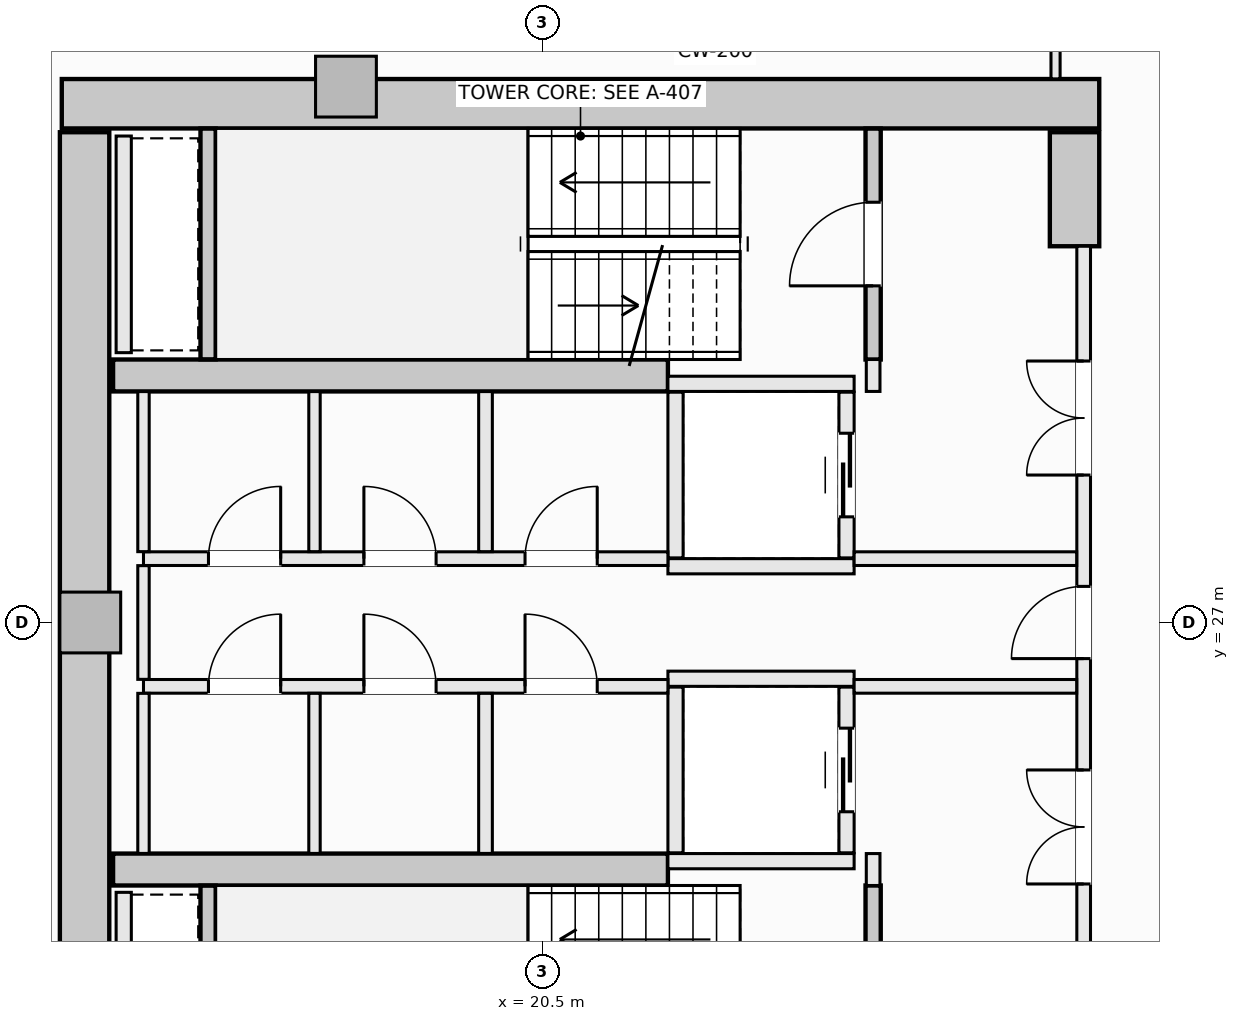
"""IFC4 building model, lengths in metres.
Left out: names, types, materials, properties, quantities, classifications, styles, units other than length and angle.
Written with IfcOpenShell. Run it as: python <this file> out.ifc"""

import sys

from ifc_helpers import new_model, si_unit, direction, frame, frame_2d, origin, origin_2d, place, context, subcontext, project, spatial, rectangle, extrude, element, fill, save


model = new_model("IFC4")
c1 = context("Model", 3, precision=1e-05, world=origin(), true_north=direction((0.0, 1.0)))
c2 = subcontext(c1, "Body", "Model", "MODEL_VIEW")
j1 = project(units=[si_unit("LENGTHUNIT", "METRE"), si_unit("PLANEANGLEUNIT", "RADIAN")], contexts=[c1])
p1 = place(None, origin())
s1 = spatial("IfcSite", under=j1, at=p1, CompositionType="ELEMENT")
p2 = place(p1, origin())
s2 = spatial("IfcBuilding", under=s1, at=p2, CompositionType="ELEMENT")
p3 = place(p2, frame((0.0, 0.0, 152.9)))
s3 = spatial("IfcBuildingStorey", under=s2, at=p3, CompositionType="ELEMENT", Elevation=152.9)
p4 = place(p3, frame((14.175, 33.825, -0.27), z_axis=(0.0, 0.0, 1.0), x_axis=(1.0, 0.0, 0.0)))
e1 = element("IfcWall", 1, at=p4, inside=s3, PredefinedType="SHEAR", context=c2, shape_type="SweptSolid", body=[
    extrude(rectangle(XDim=13.65, YDim=0.65, at=frame_2d((6.825, 0.0))), origin(), (0.0, 0.0, 1.0), 3.4),
])
p5 = place(p3, frame((14.475, 20.55, -0.27), z_axis=(0.0, 0.0, 1.0), x_axis=(0.0, 1.0, 0.0)))
e2 = element("IfcWall", 2, at=p5, inside=s3, PredefinedType="SHEAR", context=c2, shape_type="SweptSolid", body=[
    extrude(rectangle(XDim=12.9, YDim=0.65, at=frame_2d((6.45, 0.0))), origin(), (0.0, 0.0, 1.0), 3.4),
])
p6 = place(p3, frame((27.5, 31.95, -0.27), z_axis=(0.0, 0.0, 1.0), x_axis=(0.0, 1.0, 0.0)))
e3 = element("IfcWall", 3, at=p6, inside=s3, PredefinedType="SHEAR", context=c2, shape_type="SweptSolid", body=[
    extrude(rectangle(XDim=1.5, YDim=0.65, at=frame_2d((0.75, 0.0))), origin(), (0.0, 0.0, 1.0), 3.4),
])
for number, where, z_axis, x_axis in (
    (4, (14.85, 30.25, -0.27), (0.0, 0.0, 1.0), (1.0, 0.0, 0.0)),
    (5, (14.85, 23.75, -0.27), (0.0, 0.0, 1.0), (1.0, 0.0, 0.0)),
):
    element("IfcWall", number, at=place(p3, frame(where, z_axis=z_axis, x_axis=x_axis)), inside=s3, PredefinedType="SHEAR", context=c2, shape_type="SweptSolid", body=[
        extrude(rectangle(XDim=7.3, YDim=0.42, at=frame_2d((3.65, 0.0))), origin(), (0.0, 0.0, 1.0), 3.4),
    ])
for number, where, z_axis, x_axis in (
    (6, (17.914, 34.05, -0.27), (0.0, 0.0, 1.0), (1.0, 0.0, 0.0)),
    (7, (14.55, 27.0, -0.27), (0.0, 0.0, 1.0), (1.0, 0.0, 0.0)),
):
    element("IfcColumn", number, at=place(p3, frame(where, z_axis=z_axis, x_axis=x_axis)), inside=s3, PredefinedType="PILASTER", context=c2, shape_type="SweptSolid", body=[
        extrude(rectangle(XDim=0.8, YDim=0.8, at=origin_2d()), origin(), (0.0, 0.0, 1.0), 3.4),
    ])
p7 = place(p3, frame((24.85, 30.46, -0.27), z_axis=(0.0, 0.0, 1.0), x_axis=(0.0, 1.0, 0.0)))
e8 = element("IfcWall", 8, at=p7, inside=s3, PredefinedType="SHEAR", context=c2, shape_type="SweptSolid", body=[
    extrude(rectangle(XDim=3.038, YDim=0.2, at=frame_2d((1.519, 0.0))), origin(), (0.0, 0.0, 1.0), 3.4),
])
p8 = place(p7, frame((0.969, 0.0, 0.27)))
e9 = element("IfcOpeningElement", 9, at=p8, cuts=e8, PredefinedType="OPENING", context=c2, shape_type="SweptSolid", body=[
    extrude(rectangle(XDim=1.1, YDim=2.15, at=frame_2d((0.55, 1.075))), frame((0.0, 0.11, 0.0), z_axis=(0.0, -1.0, 0.0), x_axis=(1.0, 0.0, 0.0)), (0.0, 0.0, 1.0), 0.22),
])
p9 = place(p3, frame((16.1, 30.462, -0.27), z_axis=(0.0, 0.0, 1.0), x_axis=(0.0, 1.0, 0.0)))
e10 = element("IfcWall", 10, at=p9, inside=s3, PredefinedType="SHEAR", context=c2, shape_type="SweptSolid", body=[
    extrude(rectangle(XDim=3.036, YDim=0.2, at=frame_2d((1.518, 0.0))), origin(), (0.0, 0.0, 1.0), 3.4),
])
p10 = place(p3, frame((24.85, 20.502, -0.27), z_axis=(0.0, 0.0, 1.0), x_axis=(0.0, 1.0, 0.0)))
e11 = element("IfcWall", 11, at=p10, inside=s3, PredefinedType="SHEAR", context=c2, shape_type="SweptSolid", body=[
    extrude(rectangle(XDim=3.038, YDim=0.2, at=frame_2d((1.519, 0.0))), origin(), (0.0, 0.0, 1.0), 3.4),
])
p11 = place(p10, frame((0.969, 0.0, 0.27)))
e12 = element("IfcOpeningElement", 12, at=p11, cuts=e11, PredefinedType="OPENING", context=c2, shape_type="SweptSolid", body=[
    extrude(rectangle(XDim=1.1, YDim=2.15, at=frame_2d((0.55, 1.075))), frame((0.0, 0.11, 0.0), z_axis=(0.0, -1.0, 0.0), x_axis=(1.0, 0.0, 0.0)), (0.0, 0.0, 1.0), 0.22),
])
p12 = place(p3, frame((16.1, 20.502, -0.27), z_axis=(0.0, 0.0, 1.0), x_axis=(0.0, 1.0, 0.0)))
e13 = element("IfcWall", 13, at=p12, inside=s3, PredefinedType="SHEAR", context=c2, shape_type="SweptSolid", body=[
    extrude(rectangle(XDim=3.036, YDim=0.2, at=frame_2d((1.518, 0.0))), origin(), (0.0, 0.0, 1.0), 3.4),
])
for number, where, z_axis, x_axis in (
    (14, (22.15, 30.14, 0.0), (0.0, 0.0, 1.0), (1.0, 0.0, 0.0)),
    (15, (22.15, 27.74, 0.0), (0.0, 0.0, 1.0), (1.0, 0.0, 0.0)),
):
    element("IfcWall", number, at=place(p3, frame(where, z_axis=z_axis, x_axis=x_axis)), inside=s3, PredefinedType="SOLIDWALL", context=c2, shape_type="SweptSolid", body=[
        extrude(rectangle(XDim=2.45, YDim=0.2, at=frame_2d((1.225, 0.0))), origin(), (0.0, 0.0, 1.0), 3.13),
    ])
p13 = place(p3, frame((22.25, 27.85, 0.0), z_axis=(0.0, 0.0, 1.0), x_axis=(0.0, 1.0, 0.0)))
e16 = element("IfcWall", 16, at=p13, inside=s3, PredefinedType="SOLIDWALL", context=c2, shape_type="SweptSolid", body=[
    extrude(rectangle(XDim=2.18, YDim=0.2, at=frame_2d((1.09, 0.0))), origin(), (0.0, 0.0, 1.0), 3.13),
])
p14 = place(p3, frame((24.5, 27.85, 0.0), z_axis=(0.0, 0.0, 1.0), x_axis=(0.0, 1.0, 0.0)))
e17 = element("IfcWall", 17, at=p14, inside=s3, PredefinedType="SOLIDWALL", context=c2, shape_type="SweptSolid", body=[
    extrude(rectangle(XDim=2.18, YDim=0.2, at=frame_2d((1.09, 0.0))), origin(), (0.0, 0.0, 1.0), 3.13),
])
p15 = place(p14, frame((0.54, 0.0, 0.0)))
e18 = element("IfcOpeningElement", 18, at=p15, cuts=e17, PredefinedType="OPENING", context=c2, shape_type="SweptSolid", body=[
    extrude(rectangle(XDim=1.1, YDim=2.2, at=frame_2d((0.55, 1.1))), frame((0.0, 0.11, 0.0), z_axis=(0.0, -1.0, 0.0), x_axis=(1.0, 0.0, 0.0)), (0.0, 0.0, 1.0), 0.22),
])
for number, where, z_axis, x_axis in (
    (19, (22.15, 26.26, 0.0), (0.0, 0.0, 1.0), (1.0, 0.0, 0.0)),
    (20, (22.15, 23.86, 0.0), (0.0, 0.0, 1.0), (1.0, 0.0, 0.0)),
):
    element("IfcWall", number, at=place(p3, frame(where, z_axis=z_axis, x_axis=x_axis)), inside=s3, PredefinedType="SOLIDWALL", context=c2, shape_type="SweptSolid", body=[
        extrude(rectangle(XDim=2.45, YDim=0.2, at=frame_2d((1.225, 0.0))), origin(), (0.0, 0.0, 1.0), 3.13),
    ])
p16 = place(p3, frame((22.25, 23.97, 0.0), z_axis=(0.0, 0.0, 1.0), x_axis=(0.0, 1.0, 0.0)))
e21 = element("IfcWall", 21, at=p16, inside=s3, PredefinedType="SOLIDWALL", context=c2, shape_type="SweptSolid", body=[
    extrude(rectangle(XDim=2.18, YDim=0.2, at=frame_2d((1.09, 0.0))), origin(), (0.0, 0.0, 1.0), 3.13),
])
p17 = place(p3, frame((24.5, 23.97, 0.0), z_axis=(0.0, 0.0, 1.0), x_axis=(0.0, 1.0, 0.0)))
e22 = element("IfcWall", 22, at=p17, inside=s3, PredefinedType="SOLIDWALL", context=c2, shape_type="SweptSolid", body=[
    extrude(rectangle(XDim=2.18, YDim=0.2, at=frame_2d((1.09, 0.0))), origin(), (0.0, 0.0, 1.0), 3.13),
])
p18 = place(p17, frame((0.54, 0.0, 0.0)))
e23 = element("IfcOpeningElement", 23, at=p18, cuts=e22, PredefinedType="OPENING", context=c2, shape_type="SweptSolid", body=[
    extrude(rectangle(XDim=1.1, YDim=2.2, at=frame_2d((0.55, 1.1))), frame((0.0, 0.11, 0.0), z_axis=(0.0, -1.0, 0.0), x_axis=(1.0, 0.0, 0.0)), (0.0, 0.0, 1.0), 0.22),
])
for number, where, z_axis, x_axis in (
    (24, (14.99, 30.55, 0.0), (0.0, 0.0, 1.0), (0.0, 1.0, 0.0)),
    (25, (14.99, 20.6, 0.0), (0.0, 0.0, 1.0), (0.0, 1.0, 0.0)),
):
    element("IfcWall", number, at=place(p3, frame(where, z_axis=z_axis, x_axis=x_axis)), inside=s3, PredefinedType="SOLIDWALL", context=c2, shape_type="SweptSolid", body=[
        extrude(rectangle(XDim=2.85, YDim=0.2, at=frame_2d((1.425, 0.0))), origin(), (0.0, 0.0, 1.0), 3.13),
    ])
for number, where, z_axis, x_axis in (
    (26, (24.85, 23.54, 0.0), (0.0, 0.0, 1.0), (0.0, 1.0, 0.0)),
    (27, (24.85, 30.04, 0.0), (0.0, 0.0, 1.0), (0.0, 1.0, 0.0)),
):
    element("IfcWall", number, at=place(p3, frame(where, z_axis=z_axis, x_axis=x_axis)), inside=s3, PredefinedType="SOLIDWALL", context=c2, shape_type="SweptSolid", body=[
        extrude(rectangle(XDim=0.42, YDim=0.18, at=frame_2d((0.21, 0.0))), origin(), (0.0, 0.0, 1.0), 3.13),
    ])
p19 = place(p3, frame((27.62, 22.05, 0.0), z_axis=(0.0, 0.0, 1.0), x_axis=(0.0, 1.0, 0.0)))
e28 = element("IfcWall", 28, at=p19, inside=s3, PredefinedType="SOLIDWALL", context=c2, shape_type="SweptSolid", body=[
    extrude(rectangle(XDim=9.9, YDim=0.18, at=frame_2d((4.95, 0.0))), origin(), (0.0, 0.0, 1.0), 3.13),
])
p20 = place(p19, frame((4.475, 0.0, 0.0)))
e29 = element("IfcOpeningElement", 29, at=p20, cuts=e28, PredefinedType="OPENING", context=c2, shape_type="SweptSolid", body=[
    extrude(rectangle(XDim=0.95, YDim=2.1, at=frame_2d((0.475, 1.05))), frame((0.0, 0.1, 0.0), z_axis=(0.0, -1.0, 0.0), x_axis=(1.0, 0.0, 0.0)), (0.0, 0.0, 1.0), 0.2),
])
p21 = place(p19, frame((6.89, 0.0, 0.0)))
e30 = element("IfcOpeningElement", 30, at=p21, cuts=e28, PredefinedType="OPENING", context=c2, shape_type="SweptSolid", body=[
    extrude(rectangle(XDim=1.5, YDim=2.2, at=frame_2d((0.75, 1.1))), frame((0.0, 0.1, 0.0), z_axis=(0.0, -1.0, 0.0), x_axis=(1.0, 0.0, 0.0)), (0.0, 0.0, 1.0), 0.2),
])
p22 = place(p19, frame((1.51, 0.0, 0.0)))
e31 = element("IfcOpeningElement", 31, at=p22, cuts=e28, PredefinedType="OPENING", context=c2, shape_type="SweptSolid", body=[
    extrude(rectangle(XDim=1.5, YDim=2.2, at=frame_2d((0.75, 1.1))), frame((0.0, 0.1, 0.0), z_axis=(0.0, -1.0, 0.0), x_axis=(1.0, 0.0, 0.0)), (0.0, 0.0, 1.0), 0.2),
])
p23 = place(p3, frame((15.25, 27.84, 0.0), z_axis=(0.0, 0.0, 1.0), x_axis=(1.0, 0.0, 0.0)))
e32 = element("IfcWall", 32, at=p23, inside=s3, PredefinedType="SOLIDWALL", context=c2, shape_type="SweptSolid", body=[
    extrude(rectangle(XDim=6.9, YDim=0.18, at=frame_2d((3.45, 0.0))), origin(), (0.0, 0.0, 1.0), 3.13),
])
p24 = place(p23, frame((5.02, 0.0, 0.0)))
e33 = element("IfcOpeningElement", 33, at=p24, cuts=e32, PredefinedType="OPENING", context=c2, shape_type="SweptSolid", body=[
    extrude(rectangle(XDim=0.95, YDim=2.1, at=frame_2d((0.475, 1.05))), frame((0.0, 0.1, 0.0), z_axis=(0.0, -1.0, 0.0), x_axis=(1.0, 0.0, 0.0)), (0.0, 0.0, 1.0), 0.2),
])
p25 = place(p23, frame((0.855, 0.0, 0.0)))
e34 = element("IfcOpeningElement", 34, at=p25, cuts=e32, PredefinedType="OPENING", context=c2, shape_type="SweptSolid", body=[
    extrude(rectangle(XDim=0.95, YDim=2.1, at=frame_2d((0.475, 1.05))), frame((0.0, 0.1, 0.0), z_axis=(0.0, -1.0, 0.0), x_axis=(1.0, 0.0, 0.0)), (0.0, 0.0, 1.0), 0.2),
])
p26 = place(p23, frame((2.9, 0.0, 0.0)))
e35 = element("IfcOpeningElement", 35, at=p26, cuts=e32, PredefinedType="OPENING", context=c2, shape_type="SweptSolid", body=[
    extrude(rectangle(XDim=0.95, YDim=2.1, at=frame_2d((0.475, 1.05))), frame((0.0, 0.1, 0.0), z_axis=(0.0, -1.0, 0.0), x_axis=(1.0, 0.0, 0.0)), (0.0, 0.0, 1.0), 0.2),
])
p27 = place(p3, frame((24.6, 27.84, 0.0), z_axis=(0.0, 0.0, 1.0), x_axis=(1.0, 0.0, 0.0)))
e36 = element("IfcWall", 36, at=p27, inside=s3, PredefinedType="SOLIDWALL", context=c2, shape_type="SweptSolid", body=[
    extrude(rectangle(XDim=2.928, YDim=0.18, at=frame_2d((1.464, 0.0))), origin(), (0.0, 0.0, 1.0), 3.13),
])
p28 = place(p3, frame((15.25, 26.16, 0.0), z_axis=(0.0, 0.0, 1.0), x_axis=(1.0, 0.0, 0.0)))
e37 = element("IfcWall", 37, at=p28, inside=s3, PredefinedType="SOLIDWALL", context=c2, shape_type="SweptSolid", body=[
    extrude(rectangle(XDim=6.9, YDim=0.18, at=frame_2d((3.45, 0.0))), origin(), (0.0, 0.0, 1.0), 3.13),
])
p29 = place(p28, frame((5.02, 0.0, 0.0)))
e38 = element("IfcOpeningElement", 38, at=p29, cuts=e37, PredefinedType="OPENING", context=c2, shape_type="SweptSolid", body=[
    extrude(rectangle(XDim=0.95, YDim=2.1, at=frame_2d((0.475, 1.05))), frame((0.0, 0.1, 0.0), z_axis=(0.0, -1.0, 0.0), x_axis=(1.0, 0.0, 0.0)), (0.0, 0.0, 1.0), 0.2),
])
p30 = place(p28, frame((0.855, 0.0, 0.0)))
e39 = element("IfcOpeningElement", 39, at=p30, cuts=e37, PredefinedType="OPENING", context=c2, shape_type="SweptSolid", body=[
    extrude(rectangle(XDim=0.95, YDim=2.1, at=frame_2d((0.475, 1.05))), frame((0.0, 0.1, 0.0), z_axis=(0.0, -1.0, 0.0), x_axis=(1.0, 0.0, 0.0)), (0.0, 0.0, 1.0), 0.2),
])
p31 = place(p28, frame((2.9, 0.0, 0.0)))
e40 = element("IfcOpeningElement", 40, at=p31, cuts=e37, PredefinedType="OPENING", context=c2, shape_type="SweptSolid", body=[
    extrude(rectangle(XDim=0.95, YDim=2.1, at=frame_2d((0.475, 1.05))), frame((0.0, 0.1, 0.0), z_axis=(0.0, -1.0, 0.0), x_axis=(1.0, 0.0, 0.0)), (0.0, 0.0, 1.0), 0.2),
])
p32 = place(p3, frame((24.6, 26.16, 0.0), z_axis=(0.0, 0.0, 1.0), x_axis=(1.0, 0.0, 0.0)))
e41 = element("IfcWall", 41, at=p32, inside=s3, PredefinedType="SOLIDWALL", context=c2, shape_type="SweptSolid", body=[
    extrude(rectangle(XDim=2.928, YDim=0.18, at=frame_2d((1.464, 0.0))), origin(), (0.0, 0.0, 1.0), 3.13),
])
p33 = place(p3, frame((15.25, 23.962, 0.0), z_axis=(0.0, 0.0, 1.0), x_axis=(0.0, 1.0, 0.0)))
e42 = element("IfcWall", 42, at=p33, inside=s3, PredefinedType="PARTITIONING", context=c2, shape_type="SweptSolid", body=[
    extrude(rectangle(XDim=2.106, YDim=0.15, at=frame_2d((1.053, 0.0))), origin(), (0.0, 0.0, 1.0), 3.13),
])
p34 = place(p3, frame((15.25, 26.252, 0.0), z_axis=(0.0, 0.0, 1.0), x_axis=(0.0, 1.0, 0.0)))
e43 = element("IfcWall", 43, at=p34, inside=s3, PredefinedType="PARTITIONING", context=c2, shape_type="SweptSolid", body=[
    extrude(rectangle(XDim=1.496, YDim=0.15, at=frame_2d((0.748, 0.0))), origin(), (0.0, 0.0, 1.0), 3.13),
])
p35 = place(p3, frame((15.25, 27.932, 0.0), z_axis=(0.0, 0.0, 1.0), x_axis=(0.0, 1.0, 0.0)))
e44 = element("IfcWall", 44, at=p35, inside=s3, PredefinedType="PARTITIONING", context=c2, shape_type="SweptSolid", body=[
    extrude(rectangle(XDim=2.106, YDim=0.15, at=frame_2d((1.053, 0.0))), origin(), (0.0, 0.0, 1.0), 3.13),
])
for number, where, z_axis, x_axis in (
    (45, (19.75, 23.962, 0.0), (0.0, 0.0, 1.0), (0.0, 1.0, 0.0)),
    (46, (19.75, 27.932, 0.0), (0.0, 0.0, 1.0), (0.0, 1.0, 0.0)),
):
    element("IfcWall", number, at=place(p3, frame(where, z_axis=z_axis, x_axis=x_axis)), inside=s3, PredefinedType="SOLIDWALL", context=c2, shape_type="SweptSolid", body=[
        extrude(rectangle(XDim=2.106, YDim=0.18, at=frame_2d((1.053, 0.0))), origin(), (0.0, 0.0, 1.0), 3.13),
    ])
for number, where, z_axis, x_axis in (
    (47, (17.5, 23.962, 0.0), (0.0, 0.0, 1.0), (0.0, 1.0, 0.0)),
    (48, (17.5, 27.932, 0.0), (0.0, 0.0, 1.0), (0.0, 1.0, 0.0)),
):
    element("IfcWall", number, at=place(p3, frame(where, z_axis=z_axis, x_axis=x_axis)), inside=s3, PredefinedType="PARTITIONING", context=c2, shape_type="SweptSolid", body=[
        extrude(rectangle(XDim=2.106, YDim=0.15, at=frame_2d((1.053, 0.0))), origin(), (0.0, 0.0, 1.0), 3.13),
    ])
p36 = place(p3, frame((27.25, 34.152, 0.0), z_axis=(0.0, 0.0, 1.0), x_axis=(0.0, 1.0, 0.0)))
e49 = element("IfcWall", 49, at=p36, inside=s3, PredefinedType="PARTITIONING", context=c2, shape_type="SweptSolid", body=[
    extrude(rectangle(XDim=0.806, YDim=0.12, at=frame_2d((0.403, 0.0))), origin(), (0.0, 0.0, 1.0), 3.13),
])
p37 = place(p8, origin())
e50 = element("IfcDoor", 50, at=p37, inside=s3, OperationType="SINGLE_SWING_LEFT", PredefinedType="DOOR", context=c2, shape_type="SweptSolid", body=[
    extrude(rectangle(XDim=1.1, YDim=2.15, at=frame_2d((0.55, 1.075))), frame((0.0, 0.025, 0.0), z_axis=(0.0, -1.0, 0.0), x_axis=(1.0, 0.0, 0.0)), (0.0, 0.0, 1.0), 0.05),
])
fill(e9, e50)
p38 = place(p15, origin())
e51 = element("IfcDoor", 51, at=p38, inside=s3, OperationType="SLIDING_TO_LEFT", PredefinedType="DOOR", context=c2, shape_type="SweptSolid", body=[
    extrude(rectangle(XDim=1.1, YDim=2.2, at=frame_2d((0.55, 1.1))), frame((0.0, 0.025, 0.0), z_axis=(0.0, -1.0, 0.0), x_axis=(1.0, 0.0, 0.0)), (0.0, 0.0, 1.0), 0.05),
])
fill(e18, e51)
p39 = place(p18, origin())
e52 = element("IfcDoor", 52, at=p39, inside=s3, OperationType="SLIDING_TO_LEFT", PredefinedType="DOOR", context=c2, shape_type="SweptSolid", body=[
    extrude(rectangle(XDim=1.1, YDim=2.2, at=frame_2d((0.55, 1.1))), frame((0.0, 0.025, 0.0), z_axis=(0.0, -1.0, 0.0), x_axis=(1.0, 0.0, 0.0)), (0.0, 0.0, 1.0), 0.05),
])
fill(e23, e52)
p40 = place(p20, origin())
e53 = element("IfcDoor", 53, at=p40, inside=s3, OperationType="SINGLE_SWING_LEFT", PredefinedType="DOOR", context=c2, shape_type="SweptSolid", body=[
    extrude(rectangle(XDim=0.95, YDim=2.1, at=frame_2d((0.475, 1.05))), frame((0.0, 0.025, 0.0), z_axis=(0.0, -1.0, 0.0), x_axis=(1.0, 0.0, 0.0)), (0.0, 0.0, 1.0), 0.05),
])
fill(e29, e53)
p41 = place(p21, origin())
e54 = element("IfcDoor", 54, at=p41, inside=s3, OperationType="DOUBLE_DOOR_SINGLE_SWING", PredefinedType="DOOR", context=c2, shape_type="SweptSolid", body=[
    extrude(rectangle(XDim=1.5, YDim=2.2, at=frame_2d((0.75, 1.1))), frame((0.0, 0.025, 0.0), z_axis=(0.0, -1.0, 0.0), x_axis=(1.0, 0.0, 0.0)), (0.0, 0.0, 1.0), 0.05),
])
fill(e30, e54)
p42 = place(p22, origin())
e55 = element("IfcDoor", 55, at=p42, inside=s3, OperationType="DOUBLE_DOOR_SINGLE_SWING", PredefinedType="DOOR", context=c2, shape_type="SweptSolid", body=[
    extrude(rectangle(XDim=1.5, YDim=2.2, at=frame_2d((0.75, 1.1))), frame((0.0, 0.025, 0.0), z_axis=(0.0, -1.0, 0.0), x_axis=(1.0, 0.0, 0.0)), (0.0, 0.0, 1.0), 0.05),
])
fill(e31, e55)
p43 = place(p24, origin())
e56 = element("IfcDoor", 56, at=p43, inside=s3, OperationType="SINGLE_SWING_RIGHT", PredefinedType="DOOR", context=c2, shape_type="SweptSolid", body=[
    extrude(rectangle(XDim=0.95, YDim=2.1, at=frame_2d((0.475, 1.05))), frame((0.0, 0.025, 0.0), z_axis=(0.0, -1.0, 0.0), x_axis=(1.0, 0.0, 0.0)), (0.0, 0.0, 1.0), 0.05),
])
fill(e33, e56)
p44 = place(p29, origin())
e57 = element("IfcDoor", 57, at=p44, inside=s3, OperationType="SINGLE_SWING_LEFT", PredefinedType="DOOR", context=c2, shape_type="SweptSolid", body=[
    extrude(rectangle(XDim=0.95, YDim=2.1, at=frame_2d((0.475, 1.05))), frame((0.0, 0.025, 0.0), z_axis=(0.0, -1.0, 0.0), x_axis=(1.0, 0.0, 0.0)), (0.0, 0.0, 1.0), 0.05),
])
fill(e38, e57)
p45 = place(p25, origin())
e58 = element("IfcDoor", 58, at=p45, inside=s3, OperationType="SINGLE_SWING_RIGHT", PredefinedType="DOOR", context=c2, shape_type="SweptSolid", body=[
    extrude(rectangle(XDim=0.95, YDim=2.1, at=frame_2d((0.475, 1.05))), frame((0.0, 0.025, 0.0), z_axis=(0.0, -1.0, 0.0), x_axis=(1.0, 0.0, 0.0)), (0.0, 0.0, 1.0), 0.05),
])
fill(e34, e58)
p46 = place(p26, origin())
e59 = element("IfcDoor", 59, at=p46, inside=s3, OperationType="SINGLE_SWING_LEFT", PredefinedType="DOOR", context=c2, shape_type="SweptSolid", body=[
    extrude(rectangle(XDim=0.95, YDim=2.1, at=frame_2d((0.475, 1.05))), frame((0.0, 0.025, 0.0), z_axis=(0.0, -1.0, 0.0), x_axis=(1.0, 0.0, 0.0)), (0.0, 0.0, 1.0), 0.05),
])
fill(e35, e59)
p47 = place(p30, origin())
e60 = element("IfcDoor", 60, at=p47, inside=s3, OperationType="SINGLE_SWING_RIGHT", PredefinedType="DOOR", context=c2, shape_type="SweptSolid", body=[
    extrude(rectangle(XDim=0.95, YDim=2.1, at=frame_2d((0.475, 1.05))), frame((0.0, 0.025, 0.0), z_axis=(0.0, -1.0, 0.0), x_axis=(1.0, 0.0, 0.0)), (0.0, 0.0, 1.0), 0.05),
])
fill(e39, e60)
p48 = place(p31, origin())
e61 = element("IfcDoor", 61, at=p48, inside=s3, OperationType="SINGLE_SWING_LEFT", PredefinedType="DOOR", context=c2, shape_type="SweptSolid", body=[
    extrude(rectangle(XDim=0.95, YDim=2.1, at=frame_2d((0.475, 1.05))), frame((0.0, 0.025, 0.0), z_axis=(0.0, -1.0, 0.0), x_axis=(1.0, 0.0, 0.0)), (0.0, 0.0, 1.0), 0.05),
])
fill(e40, e61)
save(model, sys.argv[1])
